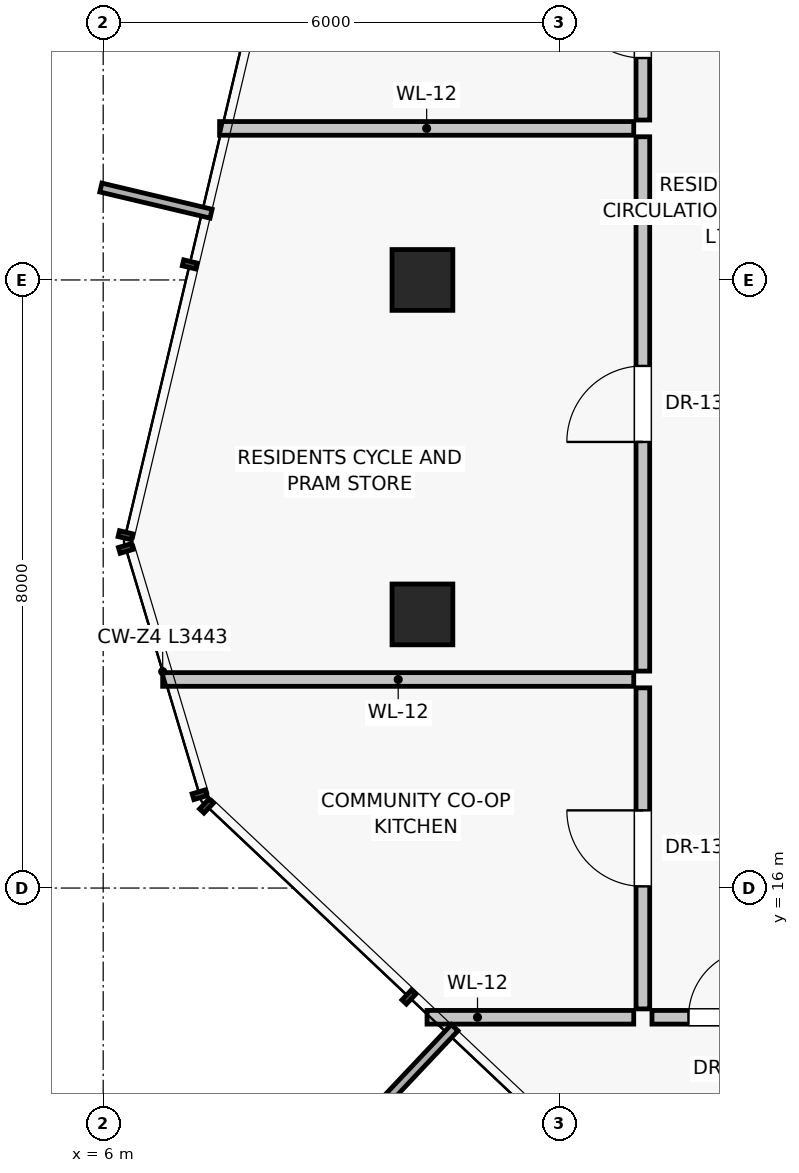
"""IFC4 building model, lengths in metres.
Left out: names, types, materials, properties, quantities, classifications, styles, units other than length and angle.
Written with IfcOpenShell. Run it as: python <this file> out.ifc"""

import sys

from ifc_helpers import new_model, si_unit, direction, frame, frame_2d, origin, origin_2d, place, context, subcontext, project, spatial, rectangle, extrude, source, transform, mapped, element, fill, save


model = new_model("IFC4")
c1 = context("Model", 3, precision=1e-05, world=origin(), true_north=direction((0.0, 1.0)))
c2 = subcontext(c1, "Body", "Model", "MODEL_VIEW")
j1 = project(units=[si_unit("LENGTHUNIT", "METRE"), si_unit("PLANEANGLEUNIT", "RADIAN")], contexts=[c1])
p1 = place(None, origin())
s1 = spatial("IfcSite", under=j1, at=p1, CompositionType="ELEMENT")
p2 = place(p1, origin())
s2 = spatial("IfcBuilding", under=s1, at=p2, CompositionType="ELEMENT")
p3 = place(p2, frame((0.0, 0.0, 254.5)))
s3 = spatial("IfcBuildingStorey", under=s2, at=p3, CompositionType="ELEMENT", Elevation=254.5)
for number, where, z_axis, x_axis in (
    (1, (10.2, 24.0, 0.0), (0.0, 0.0, 1.0), (1.0, 0.0, 0.0)),
    (2, (10.2, 19.6, 0.0), (0.0, 0.0, 1.0), (1.0, 0.0, 0.0)),
):
    element("IfcColumn", number, at=place(p3, frame(where, z_axis=z_axis, x_axis=x_axis)), inside=s3, PredefinedType="COLUMN", context=c2, shape_type="SweptSolid", body=[
        extrude(rectangle(XDim=0.8, YDim=0.8, at=origin_2d()), origin(), (0.0, 0.0, 1.0), 3.25),
    ])
p4 = place(p3, frame((12.98, 14.3, 0.0), z_axis=(0.0, 0.0, 1.0), x_axis=(-1.0, 0.0, 0.0)))
e3 = element("IfcWall", 3, at=p4, inside=s3, PredefinedType="PARTITIONING", context=c2, shape_type="SweptSolid", body=[
    extrude(rectangle(XDim=2.719, YDim=0.18, at=frame_2d((1.36, 0.0))), origin(), (0.0, 0.0, 1.0), 3.015),
])
p5 = place(p3, frame((13.1, 14.41, 0.0), z_axis=(0.0, 0.0, 1.0), x_axis=(0.0, 1.0, 0.0)))
e4 = element("IfcWall", 4, at=p5, inside=s3, PredefinedType="PARTITIONING", context=c2, shape_type="SweptSolid", body=[
    extrude(rectangle(XDim=4.224, YDim=0.18, at=frame_2d((2.112, 0.0))), origin(), (0.0, 0.0, 1.0), 2.662),
])
p6 = place(p5, frame((1.612, 0.0, 0.0)))
e5 = element("IfcOpeningElement", 5, at=p6, cuts=e4, PredefinedType="OPENING", context=c2, shape_type="SweptSolid", body=[
    extrude(rectangle(XDim=1.0, YDim=2.01, at=frame_2d((0.5, 1.005))), frame((0.0, 0.1, 0.0), z_axis=(0.0, -1.0, 0.0), x_axis=(1.0, 0.0, 0.0)), (0.0, 0.0, 1.0), 0.2),
])
p7 = place(p3, frame((13.1, 18.854, 0.0), z_axis=(0.0, 0.0, 1.0), x_axis=(0.0, 1.0, 0.0)))
e6 = element("IfcWall", 6, at=p7, inside=s3, PredefinedType="PARTITIONING", context=c2, shape_type="SweptSolid", body=[
    extrude(rectangle(XDim=7.03, YDim=0.18, at=frame_2d((3.515, 0.0))), origin(), (0.0, 0.0, 1.0), 2.662),
])
p8 = place(p7, frame((3.015, 0.0, 0.0)))
e7 = element("IfcOpeningElement", 7, at=p8, cuts=e6, PredefinedType="OPENING", context=c2, shape_type="SweptSolid", body=[
    extrude(rectangle(XDim=1.0, YDim=2.01, at=frame_2d((0.5, 1.005))), frame((0.0, 0.1, 0.0), z_axis=(0.0, -1.0, 0.0), x_axis=(1.0, 0.0, 0.0)), (0.0, 0.0, 1.0), 0.2),
])
p9 = place(p3, frame((12.98, 18.744, 0.0), z_axis=(0.0, 0.0, 1.0), x_axis=(-1.0, 0.0, 0.0)))
e8 = element("IfcWall", 8, at=p9, inside=s3, PredefinedType="PARTITIONING", context=c2, shape_type="SweptSolid", body=[
    extrude(rectangle(XDim=6.198, YDim=0.18, at=frame_2d((3.099, 0.0))), origin(), (0.0, 0.0, 1.0), 3.015),
])
p10 = place(p3, frame((12.98, 25.994, 0.0), z_axis=(0.0, 0.0, 1.0), x_axis=(-1.0, 0.0, 0.0)))
e9 = element("IfcWall", 9, at=p10, inside=s3, PredefinedType="PARTITIONING", context=c2, shape_type="SweptSolid", body=[
    extrude(rectangle(XDim=5.449, YDim=0.18, at=frame_2d((2.724, 0.0))), origin(), (0.0, 0.0, 1.0), 3.015),
])
p11 = place(p3, frame((13.1, 26.104, 0.0), z_axis=(0.0, 0.0, 1.0), x_axis=(0.0, 1.0, 0.0)))
e10 = element("IfcWall", 10, at=p11, inside=s3, PredefinedType="PARTITIONING", context=c2, shape_type="SweptSolid", body=[
    extrude(rectangle(XDim=2.632, YDim=0.18, at=frame_2d((1.316, 0.0))), origin(), (0.0, 0.0, 1.0), 2.662),
])
p12 = place(p11, frame((0.816, 0.0, 0.0)))
e11 = element("IfcOpeningElement", 11, at=p12, cuts=e10, PredefinedType="OPENING", context=c2, shape_type="SweptSolid", body=[
    extrude(rectangle(XDim=1.0, YDim=2.01, at=frame_2d((0.5, 1.005))), frame((0.0, 0.1, 0.0), z_axis=(0.0, -1.0, 0.0), x_axis=(1.0, 0.0, 0.0)), (0.0, 0.0, 1.0), 0.2),
])
p13 = place(p3, frame((13.22, 14.3, 0.0), z_axis=(0.0, 0.0, 1.0), x_axis=(1.0, 0.0, 0.0)))
e12 = element("IfcWall", 12, at=p13, inside=s3, PredefinedType="PARTITIONING", context=c2, shape_type="SweptSolid", body=[
    extrude(rectangle(XDim=1.86, YDim=0.18, at=frame_2d((0.93, 0.0))), origin(), (0.0, 0.0, 1.0), 3.015),
])
p14 = place(p13, frame((0.48, 0.0, 0.0)))
e13 = element("IfcOpeningElement", 13, at=p14, cuts=e12, PredefinedType="OPENING", context=c2, shape_type="SweptSolid", body=[
    extrude(rectangle(XDim=0.9, YDim=2.01, at=frame_2d((0.45, 1.005))), frame((0.0, 0.1, 0.0), z_axis=(0.0, -1.0, 0.0), x_axis=(1.0, 0.0, 0.0)), (0.0, 0.0, 1.0), 0.2),
])
m1 = source(origin(), c2, "Body", "SweptSolid", [
    extrude(rectangle(XDim=1.0, YDim=2.01, at=frame_2d((0.5, 1.005))), frame((0.0, 0.025, 0.0), z_axis=(0.0, -1.0, 0.0), x_axis=(1.0, 0.0, 0.0)), (0.0, 0.0, 1.0), 0.05),
])
p15 = place(p6, origin())
e14 = element("IfcDoor", 14, at=p15, inside=s3, OperationType="SINGLE_SWING_RIGHT", PredefinedType="DOOR", context=c2, shape_type="MappedRepresentation", body=[
    mapped(m1, transform((0.0, 0.0, 0.0), scale=1.0)),
])
fill(e5, e14)
p16 = place(p8, origin())
e15 = element("IfcDoor", 15, at=p16, inside=s3, OperationType="SINGLE_SWING_LEFT", PredefinedType="DOOR", context=c2, shape_type="MappedRepresentation", body=[
    mapped(m1, transform((0.0, 0.0, 0.0), scale=1.0)),
])
fill(e7, e15)
p17 = place(p12, origin())
e16 = element("IfcDoor", 16, at=p17, inside=s3, OperationType="SINGLE_SWING_RIGHT", PredefinedType="DOOR", context=c2, shape_type="MappedRepresentation", body=[
    mapped(m1, transform((0.0, 0.0, 0.0), scale=1.0)),
])
fill(e11, e16)
m2 = source(origin(), c2, "Body", "SweptSolid", [
    extrude(rectangle(XDim=0.9, YDim=2.01, at=frame_2d((0.45, 1.005))), frame((0.0, 0.025, 0.0), z_axis=(0.0, -1.0, 0.0), x_axis=(1.0, 0.0, 0.0)), (0.0, 0.0, 1.0), 0.05),
])
p18 = place(p14, origin())
e17 = element("IfcDoor", 17, at=p18, inside=s3, OperationType="SINGLE_SWING_RIGHT", PredefinedType="DOOR", context=c2, shape_type="MappedRepresentation", body=[
    mapped(m2, transform((0.0, 0.0, 0.0), scale=1.0)),
])
fill(e13, e17)
save(model, sys.argv[1])
